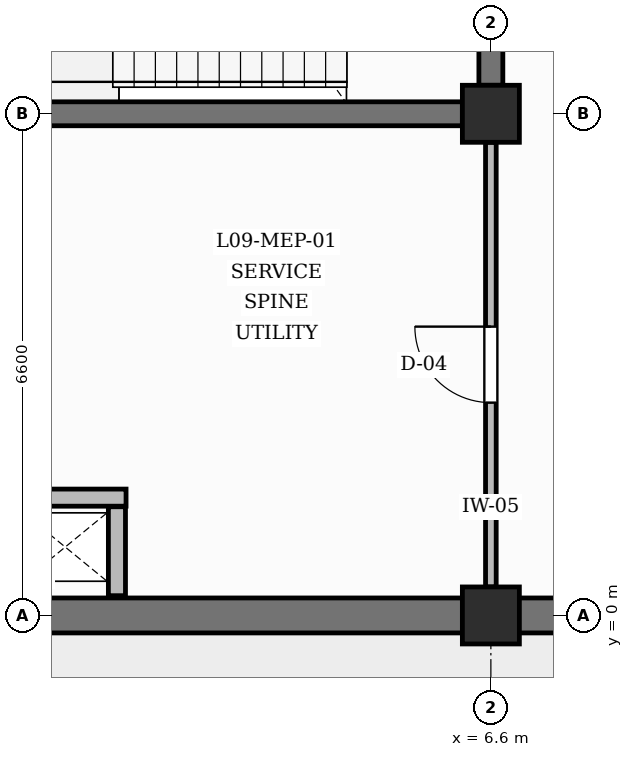
"""IFC4 building model, lengths in metres.
Left out: names, types, materials, properties, quantities, classifications, styles, units other than length and angle.
Written with IfcOpenShell. Run it as: python <this file> out.ifc"""

import sys

from ifc_helpers import new_model, si_unit, direction, frame, frame_2d, origin, origin_2d, place, context, subcontext, project, spatial, rectangle, extrude, element, fill, save


model = new_model("IFC4")
c1 = context("Model", 3, precision=1e-05, world=origin(), true_north=direction((0.0, 1.0)))
c2 = subcontext(c1, "Body", "Model", "MODEL_VIEW")
j1 = project(units=[si_unit("LENGTHUNIT", "METRE"), si_unit("PLANEANGLEUNIT", "RADIAN")], contexts=[c1])
p1 = place(None, origin())
s1 = spatial("IfcSite", under=j1, at=p1, CompositionType="ELEMENT")
p2 = place(p1, origin())
s2 = spatial("IfcBuilding", under=s1, at=p2, CompositionType="ELEMENT")
p3 = place(p2, frame((0.0, 0.0, 39.6)))
s3 = spatial("IfcBuildingStorey", under=s2, at=p3, CompositionType="ELEMENT", Elevation=39.6)
for number, where, z_axis, x_axis in (
    (1, (6.6, 0.0, 0.0), (0.0, 0.0, 1.0), (1.0, 0.0, 0.0)),
    (2, (6.6, 6.6, 0.0), (0.0, 0.0, 1.0), (1.0, 0.0, 0.0)),
):
    element("IfcColumn", number, at=place(p3, frame(where, z_axis=z_axis, x_axis=x_axis)), inside=s3, PredefinedType="COLUMN", context=c2, shape_type="SweptSolid", body=[
        extrude(rectangle(XDim=0.75, YDim=0.75, at=origin_2d()), origin(), (0.0, 0.0, 1.0), 4.2),
    ])
p4 = place(p3, frame((0.375, 0.0, 0.0), z_axis=(0.0, 0.0, 1.0), x_axis=(1.0, 0.0, 0.0)))
e3 = element("IfcWall", 3, at=p4, inside=s3, PredefinedType="SOLIDWALL", context=c2, shape_type="SweptSolid", body=[
    extrude(rectangle(XDim=5.85, YDim=0.46, at=frame_2d((2.925, 0.0))), origin(), (0.0, 0.0, 1.0), 3.29),
])
p5 = place(p3, frame((6.975, 0.0, 0.0), z_axis=(0.0, 0.0, 1.0), x_axis=(1.0, 0.0, 0.0)))
e4 = element("IfcWall", 4, at=p5, inside=s3, PredefinedType="SOLIDWALL", context=c2, shape_type="SweptSolid", body=[
    extrude(rectangle(XDim=5.85, YDim=0.46, at=frame_2d((2.925, 0.0))), origin(), (0.0, 0.0, 1.0), 3.29),
])
p6 = place(p3, frame((0.375, 6.6, 0.0), z_axis=(0.0, 0.0, 1.0), x_axis=(1.0, 0.0, 0.0)))
e5 = element("IfcWall", 5, at=p6, inside=s3, PredefinedType="SHEAR", context=c2, shape_type="SweptSolid", body=[
    extrude(rectangle(XDim=5.85, YDim=0.315, at=frame_2d((2.925, 0.0))), origin(), (0.0, 0.0, 1.0), 3.29),
])
p7 = place(p3, frame((6.6, 6.975, 0.0), z_axis=(0.0, 0.0, 1.0), x_axis=(0.0, 1.0, 0.0)))
e6 = element("IfcWall", 6, at=p7, inside=s3, PredefinedType="SHEAR", context=c2, shape_type="SweptSolid", body=[
    extrude(rectangle(XDim=5.85, YDim=0.315, at=frame_2d((2.925, 0.0))), origin(), (0.0, 0.0, 1.0), 3.29),
])
p8 = place(p7, frame((2.375, 0.0, 0.0)))
e7 = element("IfcOpeningElement", 7, at=p8, cuts=e6, PredefinedType="OPENING", context=c2, shape_type="SweptSolid", body=[
    extrude(rectangle(XDim=1.1, YDim=2.15, at=frame_2d((0.55, 1.075))), frame((0.0, 0.167, 0.0), z_axis=(0.0, -1.0, 0.0), x_axis=(1.0, 0.0, 0.0)), (0.0, 0.0, 1.0), 0.335),
])
p9 = place(p3, frame((1.68, 0.26, 0.0), z_axis=(0.0, 0.0, 1.0), x_axis=(0.0, 1.0, 0.0)))
e8 = element("IfcWall", 8, at=p9, inside=s3, PredefinedType="PARTITIONING", context=c2, shape_type="SweptSolid", body=[
    extrude(rectangle(XDim=1.17, YDim=0.225, at=frame_2d((0.585, 0.0))), origin(), (0.0, 0.0, 1.0), 3.89),
])
p10 = place(p3, frame((0.26, 1.55, 0.0), z_axis=(0.0, 0.0, 1.0), x_axis=(1.0, 0.0, 0.0)))
e9 = element("IfcWall", 9, at=p10, inside=s3, PredefinedType="PARTITIONING", context=c2, shape_type="SweptSolid", body=[
    extrude(rectangle(XDim=1.54, YDim=0.225, at=frame_2d((0.77, 0.0))), origin(), (0.0, 0.0, 1.0), 3.89),
])
p11 = place(p3, frame((6.6, 0.375, 0.0), z_axis=(0.0, 0.0, 1.0), x_axis=(0.0, 1.0, 0.0)))
e10 = element("IfcWall", 10, at=p11, inside=s3, PredefinedType="PARTITIONING", context=c2, shape_type="SweptSolid", body=[
    extrude(rectangle(XDim=5.85, YDim=0.14, at=frame_2d((2.925, 0.0))), origin(), (0.0, 0.0, 1.0), 3.29),
])
p12 = place(p11, frame((2.425, 0.0, 0.0)))
e11 = element("IfcOpeningElement", 11, at=p12, cuts=e10, PredefinedType="OPENING", context=c2, shape_type="SweptSolid", body=[
    extrude(rectangle(XDim=1.0, YDim=2.1, at=frame_2d((0.5, 1.05))), frame((0.0, 0.08, 0.0), z_axis=(0.0, -1.0, 0.0), x_axis=(1.0, 0.0, 0.0)), (0.0, 0.0, 1.0), 0.16),
])
p13 = place(p12, origin())
e12 = element("IfcDoor", 12, at=p13, inside=s3, OperationType="SINGLE_SWING_RIGHT", PredefinedType="DOOR", context=c2, shape_type="SweptSolid", body=[
    extrude(rectangle(XDim=1.0, YDim=2.1, at=frame_2d((0.5, 1.05))), frame((0.0, 0.025, 0.0), z_axis=(0.0, -1.0, 0.0), x_axis=(1.0, 0.0, 0.0)), (0.0, 0.0, 1.0), 0.05),
])
fill(e11, e12)
save(model, sys.argv[1])
